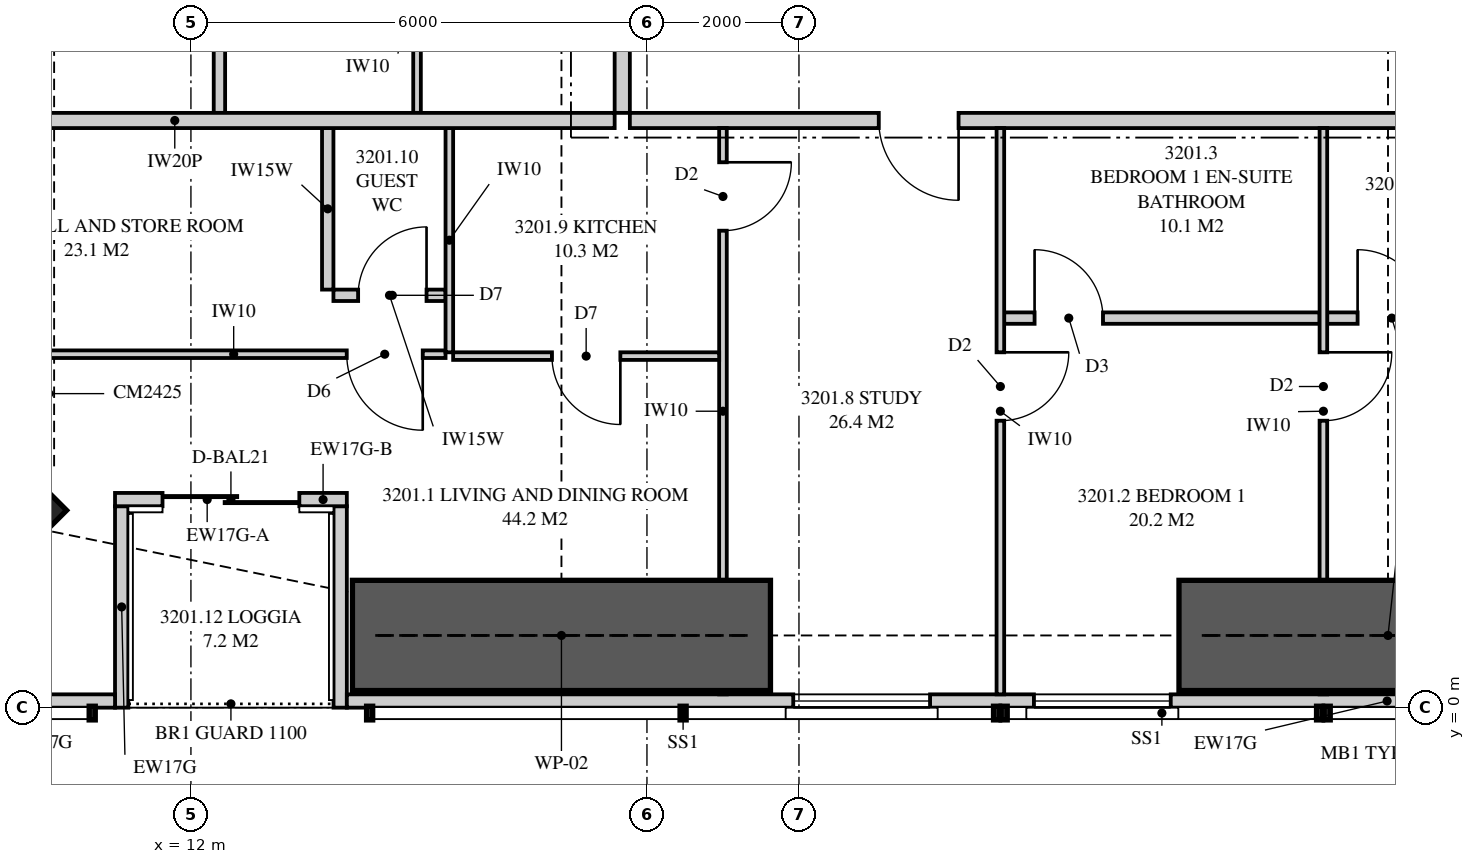
"""IFC4 building model, lengths in metres.
Left out: names, types, materials, properties, quantities, classifications, styles, units other than length and angle.
Written with IfcOpenShell. Run it as: python <this file> out.ifc"""

import sys

from ifc_helpers import new_model, si_unit, direction, frame, frame_2d, origin, origin_2d, place, context, subcontext, project, spatial, polyline, rectangle, outline, extrude, element, fill, save


model = new_model("IFC4")
c1 = context("Model", 3, precision=1e-05, world=origin(), true_north=direction((0.0, 1.0)))
c2 = subcontext(c1, "Body", "Model", "MODEL_VIEW")
j1 = project(units=[si_unit("LENGTHUNIT", "METRE"), si_unit("PLANEANGLEUNIT", "RADIAN")], contexts=[c1])
p1 = place(None, origin())
s1 = spatial("IfcSite", under=j1, at=p1, CompositionType="ELEMENT")
p2 = place(p1, origin())
s2 = spatial("IfcBuilding", under=s1, at=p2, CompositionType="ELEMENT")
p3 = place(p2, frame((0.0, 0.0, 118.25)))
s3 = spatial("IfcBuildingStorey", under=s2, at=p3, CompositionType="ELEMENT", Elevation=118.25)
p4 = place(p3, frame((8.631, 2.631, 0.0), z_axis=(0.0, 0.0, 1.0), x_axis=(0.707106781187, 0.707106781187, 0.0)))
e1 = element("IfcColumn", 1, at=p4, inside=s3, PredefinedType="COLUMN", context=c2, shape_type="SweptSolid", body=[
    extrude(rectangle(XDim=2.4, YDim=2.5, at=origin_2d()), origin(), (0.0, 0.0, 1.0), 3.35),
])
p5 = place(p3, frame((9.051, 0.087, 0.0), z_axis=(0.0, 0.0, 1.0), x_axis=(1.0, 0.0, 0.0)))
e2 = element("IfcWall", 2, at=p5, inside=s3, PredefinedType="SOLIDWALL", context=c2, shape_type="SweptSolid", body=[
    extrude(rectangle(XDim=1.95, YDim=0.175, at=frame_2d((0.975, 0.0))), origin(), (0.0, 0.0, 1.0), 3.11),
])
p6 = place(p3, frame((14.051, 0.087, 0.0), z_axis=(0.0, 0.0, 1.0), x_axis=(1.0, 0.0, 0.0)))
e3 = element("IfcWall", 3, at=p6, inside=s3, PredefinedType="SOLIDWALL", context=c2, shape_type="SweptSolid", body=[
    extrude(outline(polyline([(0.0, 0.0), (27.374, 0.0), (27.374, 3.11), (24.777, 3.11), (24.777, 2.15), (24.732, 2.15), (24.732, 3.11), (24.574, 3.11), (24.574, 2.15), (2.824, 2.15), (2.824, 3.11), (2.666, 3.11), (2.666, 2.15), (2.62, 2.15), (2.62, 3.11), (0.0, 3.11), (0.0, 0.0)])), frame((0.0, 0.087, 0.0), z_axis=(0.0, -1.0, 0.0), x_axis=(1.0, 0.0, 0.0)), (0.0, 0.0, 1.0), 0.175),
])
p7 = place(p6, frame((5.874, 0.0, 0.4)))
e4 = element("IfcOpeningElement", 4, at=p7, cuts=e3, PredefinedType="OPENING", context=c2, shape_type="SweptSolid", body=[
    extrude(rectangle(XDim=1.8, YDim=1.7, at=frame_2d((0.9, 0.85))), frame((0.0, 0.097, 0.0), z_axis=(0.0, -1.0, 0.0), x_axis=(1.0, 0.0, 0.0)), (0.0, 0.0, 1.0), 0.195),
])
p8 = place(p6, frame((9.04, 0.0, 0.4)))
e5 = element("IfcOpeningElement", 5, at=p8, cuts=e3, PredefinedType="OPENING", context=c2, shape_type="SweptSolid", body=[
    extrude(rectangle(XDim=1.8, YDim=1.7, at=frame_2d((0.9, 0.85))), frame((0.0, 0.097, 0.0), z_axis=(0.0, -1.0, 0.0), x_axis=(1.0, 0.0, 0.0)), (0.0, 0.0, 1.0), 0.195),
])
p9 = place(p6, frame((16.564, 0.0, 0.4)))
e6 = element("IfcOpeningElement", 6, at=p9, cuts=e3, PredefinedType="OPENING", context=c2, shape_type="SweptSolid", body=[
    extrude(rectangle(XDim=1.8, YDim=1.7, at=frame_2d((0.9, 0.85))), frame((0.0, 0.097, 0.0), z_axis=(0.0, -1.0, 0.0), x_axis=(1.0, 0.0, 0.0)), (0.0, 0.0, 1.0), 0.195),
])
p10 = place(p6, frame((19.889, 0.0, 0.4)))
e7 = element("IfcOpeningElement", 7, at=p10, cuts=e3, PredefinedType="OPENING", context=c2, shape_type="SweptSolid", body=[
    extrude(rectangle(XDim=1.8, YDim=1.7, at=frame_2d((0.9, 0.85))), frame((0.0, 0.097, 0.0), z_axis=(0.0, -1.0, 0.0), x_axis=(1.0, 0.0, 0.0)), (0.0, 0.0, 1.0), 0.195),
])
p11 = place(p3, frame((11.001, 2.738, 0.0), z_axis=(0.0, 0.0, 1.0), x_axis=(1.0, 0.0, 0.0)))
e8 = element("IfcWall", 8, at=p11, inside=s3, PredefinedType="SOLIDWALL", context=c2, shape_type="SweptSolid", body=[
    extrude(rectangle(XDim=2.425, YDim=0.175, at=frame_2d((1.212, 0.0))), origin(), (0.0, 0.0, 1.0), 2.15),
])
p12 = place(p11, frame((0.625, 0.0, 0.0)))
e9 = element("IfcOpeningElement", 9, at=p12, cuts=e8, PredefinedType="OPENING", context=c2, shape_type="SweptSolid", body=[
    extrude(rectangle(XDim=1.8, YDim=2.1, at=frame_2d((0.9, 1.05))), frame((0.0, 0.097, 0.0), z_axis=(0.0, -1.0, 0.0), x_axis=(1.0, 0.0, 0.0)), (0.0, 0.0, 1.0), 0.195),
])
p13 = place(p3, frame((13.426, 2.738, 0.0), z_axis=(0.0, 0.0, 1.0), x_axis=(1.0, 0.0, 0.0)))
e10 = element("IfcWall", 10, at=p13, inside=s3, PredefinedType="SOLIDWALL", context=c2, shape_type="SweptSolid", body=[
    extrude(rectangle(XDim=0.625, YDim=0.175, at=frame_2d((0.312, 0.0))), origin(), (0.0, 0.0, 1.0), 3.11),
])
p14 = place(p3, frame((11.089, 0.0, 0.0), z_axis=(0.0, 0.0, 1.0), x_axis=(0.0, 1.0, 0.0)))
e11 = element("IfcWall", 11, at=p14, inside=s3, PredefinedType="SOLIDWALL", context=c2, shape_type="SweptSolid", body=[
    extrude(outline(polyline([(0.0, 0.0), (2.65, 0.0), (2.65, 2.15), (1.296, 2.15), (1.296, 3.11), (0.0, 3.11), (0.0, 0.0)])), frame((0.0, 0.087, 0.0), z_axis=(0.0, -1.0, 0.0), x_axis=(1.0, 0.0, 0.0)), (0.0, 0.0, 1.0), 0.175),
])
p15 = place(p3, frame((13.964, 0.0, 0.0), z_axis=(0.0, 0.0, 1.0), x_axis=(0.0, 1.0, 0.0)))
e12 = element("IfcWall", 12, at=p15, inside=s3, PredefinedType="SOLIDWALL", context=c2, shape_type="SweptSolid", body=[
    extrude(outline(polyline([(0.0, 0.0), (2.65, 0.0), (2.65, 3.11), (2.378, 3.11), (2.378, 2.15), (0.709, 2.15), (0.709, 3.11), (0.0, 3.11), (0.0, 0.0)])), frame((0.0, 0.087, 0.0), z_axis=(0.0, -1.0, 0.0), x_axis=(1.0, 0.0, 0.0)), (0.0, 0.0, 1.0), 0.175),
])
p16 = place(p3, frame((17.775, 7.725, 0.0), z_axis=(0.0, 0.0, 1.0), x_axis=(1.0, 0.0, 0.0)))
e13 = element("IfcWall", 13, at=p16, inside=s3, PredefinedType="PARTITIONING", context=c2, shape_type="SweptSolid", body=[
    extrude(outline(polyline([(0.0, 0.0), (19.225, 0.0), (19.225, 3.11), (10.312, 3.11), (10.312, 2.541), (9.638, 2.541), (9.638, 3.11), (0.0, 3.11), (0.0, 0.0)])), frame((0.0, 0.1, 0.0), z_axis=(0.0, -1.0, 0.0), x_axis=(1.0, 0.0, 0.0)), (0.0, 0.0, 1.0), 0.2),
])
p17 = place(p16, frame((3.275, 0.0, 0.0)))
e14 = element("IfcOpeningElement", 14, at=p17, cuts=e13, PredefinedType="OPENING", context=c2, shape_type="SweptSolid", body=[
    extrude(rectangle(XDim=1.05, YDim=2.2, at=frame_2d((0.525, 1.1))), frame((0.0, 0.11, 0.0), z_axis=(0.0, -1.0, 0.0), x_axis=(1.0, 0.0, 0.0)), (0.0, 0.0, 1.0), 0.22),
])
p18 = place(p3, frame((22.65, 0.175, 0.0), z_axis=(0.0, 0.0, 1.0), x_axis=(0.0, 1.0, 0.0)))
e15 = element("IfcWall", 15, at=p18, inside=s3, PredefinedType="PARTITIONING", context=c2, shape_type="SweptSolid", body=[
    extrude(outline(polyline([(0.0, 0.0), (7.45, 0.0), (7.45, 3.11), (1.635, 3.11), (1.635, 2.15), (0.0, 2.15), (0.0, 3.11), (0.0, 0.0)])), frame((0.0, 0.05, 0.0), z_axis=(0.0, -1.0, 0.0), x_axis=(1.0, 0.0, 0.0)), (0.0, 0.0, 1.0), 0.1),
])
p19 = place(p18, frame((3.6, 0.0, 0.0)))
e16 = element("IfcOpeningElement", 16, at=p19, cuts=e15, PredefinedType="OPENING", context=c2, shape_type="SweptSolid", body=[
    extrude(rectangle(XDim=0.9, YDim=2.1, at=frame_2d((0.45, 1.05))), frame((0.0, 0.06, 0.0), z_axis=(0.0, -1.0, 0.0), x_axis=(1.0, 0.0, 0.0)), (0.0, 0.0, 1.0), 0.12),
])
p20 = place(p3, frame((26.9, 0.175, 0.0), z_axis=(0.0, 0.0, 1.0), x_axis=(0.0, 1.0, 0.0)))
e17 = element("IfcWall", 17, at=p20, inside=s3, PredefinedType="PARTITIONING", context=c2, shape_type="SweptSolid", body=[
    extrude(outline(polyline([(0.529, 2.15), (0.0, 2.15), (0.0, 0.0), (0.529, 0.0), (0.529, 0.889), (1.021, 0.889), (1.021, 0.0), (7.45, 0.0), (7.45, 3.11), (1.635, 3.11), (1.635, 2.15), (1.021, 2.15), (1.021, 1.261), (0.529, 1.261), (0.529, 2.15)])), frame((0.0, 0.05, 0.0), z_axis=(0.0, -1.0, 0.0), x_axis=(1.0, 0.0, 0.0)), (0.0, 0.0, 1.0), 0.1),
])
p21 = place(p20, frame((3.6, 0.0, 0.0)))
e18 = element("IfcOpeningElement", 18, at=p21, cuts=e17, PredefinedType="OPENING", context=c2, shape_type="SweptSolid", body=[
    extrude(rectangle(XDim=0.9, YDim=2.1, at=frame_2d((0.45, 1.05))), frame((0.0, 0.06, 0.0), z_axis=(0.0, -1.0, 0.0), x_axis=(1.0, 0.0, 0.0)), (0.0, 0.0, 1.0), 0.12),
])
p22 = place(p3, frame((22.7, 5.125, 0.0), z_axis=(0.0, 0.0, 1.0), x_axis=(1.0, 0.0, 0.0)))
e19 = element("IfcWall", 19, at=p22, inside=s3, PredefinedType="PLUMBINGWALL", context=c2, shape_type="SweptSolid", body=[
    extrude(rectangle(XDim=4.15, YDim=0.15, at=frame_2d((2.075, 0.0))), origin(), (0.0, 0.0, 1.0), 3.11),
])
p23 = place(p22, frame((0.4, 0.0, 0.0)))
e20 = element("IfcOpeningElement", 20, at=p23, cuts=e19, PredefinedType="OPENING", context=c2, shape_type="SweptSolid", body=[
    extrude(rectangle(XDim=0.9, YDim=2.1, at=frame_2d((0.45, 1.05))), frame((0.0, 0.085, 0.0), z_axis=(0.0, -1.0, 0.0), x_axis=(1.0, 0.0, 0.0)), (0.0, 0.0, 1.0), 0.17),
])
p24 = place(p3, frame((26.95, 5.125, 0.0), z_axis=(0.0, 0.0, 1.0), x_axis=(1.0, 0.0, 0.0)))
e21 = element("IfcWall", 21, at=p24, inside=s3, PredefinedType="PLUMBINGWALL", context=c2, shape_type="SweptSolid", body=[
    extrude(outline(polyline([(0.0, 0.0), (5.9, 0.0), (5.9, 3.11), (1.112, 3.11), (1.112, 2.541), (0.488, 2.541), (0.488, 3.11), (0.0, 3.11), (0.0, 0.0)])), frame((0.0, 0.075, 0.0), z_axis=(0.0, -1.0, 0.0), x_axis=(1.0, 0.0, 0.0)), (0.0, 0.0, 1.0), 0.15),
])
p25 = place(p24, frame((0.4, 0.0, 0.0)))
e22 = element("IfcOpeningElement", 22, at=p25, cuts=e21, PredefinedType="OPENING", context=c2, shape_type="SweptSolid", body=[
    extrude(rectangle(XDim=0.9, YDim=2.1, at=frame_2d((0.45, 1.05))), frame((0.0, 0.085, 0.0), z_axis=(0.0, -1.0, 0.0), x_axis=(1.0, 0.0, 0.0)), (0.0, 0.0, 1.0), 0.17),
])
p26 = place(p3, frame((19.0, 0.175, 0.0), z_axis=(0.0, 0.0, 1.0), x_axis=(0.0, 1.0, 0.0)))
e23 = element("IfcWall", 23, at=p26, inside=s3, PredefinedType="PARTITIONING", context=c2, shape_type="SweptSolid", body=[
    extrude(outline(polyline([(0.529, 2.15), (0.0, 2.15), (0.0, 0.0), (0.529, 0.0), (0.529, 0.017), (1.021, 0.017), (1.021, 0.0), (7.45, 0.0), (7.45, 3.11), (1.635, 3.11), (1.635, 2.15), (1.021, 2.15), (1.021, 2.133), (0.529, 2.133), (0.529, 2.15)])), frame((0.0, 0.05, 0.0), z_axis=(0.0, -1.0, 0.0), x_axis=(1.0, 0.0, 0.0)), (0.0, 0.0, 1.0), 0.1),
])
p27 = place(p26, frame((6.1, 0.0, 0.0)))
e24 = element("IfcOpeningElement", 24, at=p27, cuts=e23, PredefinedType="OPENING", context=c2, shape_type="SweptSolid", body=[
    extrude(rectangle(XDim=0.9, YDim=2.1, at=frame_2d((0.45, 1.05))), frame((0.0, 0.06, 0.0), z_axis=(0.0, -1.0, 0.0), x_axis=(1.0, 0.0, 0.0)), (0.0, 0.0, 1.0), 0.12),
])
p28 = place(p3, frame((15.45, 4.625, 0.0), z_axis=(0.0, 0.0, 1.0), x_axis=(1.0, 0.0, 0.0)))
e25 = element("IfcWall", 25, at=p28, inside=s3, PredefinedType="PARTITIONING", context=c2, shape_type="SweptSolid", body=[
    extrude(outline(polyline([(0.0, 0.0), (3.5, 0.0), (3.5, 3.11), (1.712, 3.11), (1.712, 2.541), (1.138, 2.541), (1.138, 3.11), (0.0, 3.11), (0.0, 0.0)])), frame((0.0, 0.05, 0.0), z_axis=(0.0, -1.0, 0.0), x_axis=(1.0, 0.0, 0.0)), (0.0, 0.0, 1.0), 0.1),
])
p29 = place(p28, frame((1.3, 0.0, 0.0)))
e26 = element("IfcOpeningElement", 26, at=p29, cuts=e25, PredefinedType="OPENING", context=c2, shape_type="SweptSolid", body=[
    extrude(rectangle(XDim=0.9, YDim=2.1, at=frame_2d((0.45, 1.05))), frame((0.0, 0.06, 0.0), z_axis=(0.0, -1.0, 0.0), x_axis=(1.0, 0.0, 0.0)), (0.0, 0.0, 1.0), 0.12),
])
p30 = place(p3, frame((15.4, 4.675, 0.0), z_axis=(0.0, 0.0, 1.0), x_axis=(0.0, 1.0, 0.0)))
e27 = element("IfcWall", 27, at=p30, inside=s3, PredefinedType="PARTITIONING", context=c2, shape_type="SweptSolid", body=[
    extrude(rectangle(XDim=2.95, YDim=0.1, at=frame_2d((1.475, 0.0))), origin(), (0.0, 0.0, 1.0), 3.11),
])
p31 = place(p3, frame((13.875, 5.425, 0.0), z_axis=(0.0, 0.0, 1.0), x_axis=(1.0, 0.0, 0.0)))
e28 = element("IfcWall", 28, at=p31, inside=s3, PredefinedType="PLUMBINGWALL", context=c2, shape_type="SweptSolid", body=[
    extrude(rectangle(XDim=1.475, YDim=0.15, at=frame_2d((0.738, 0.0))), origin(), (0.0, 0.0, 1.0), 3.11),
])
p32 = place(p31, frame((0.325, 0.0, 0.0)))
e29 = element("IfcOpeningElement", 29, at=p32, cuts=e28, PredefinedType="OPENING", context=c2, shape_type="SweptSolid", body=[
    extrude(rectangle(XDim=0.9, YDim=2.1, at=frame_2d((0.45, 1.05))), frame((0.0, 0.085, 0.0), z_axis=(0.0, -1.0, 0.0), x_axis=(1.0, 0.0, 0.0)), (0.0, 0.0, 1.0), 0.17),
])
p33 = place(p3, frame((13.8, 5.5, 0.0), z_axis=(0.0, 0.0, 1.0), x_axis=(0.0, 1.0, 0.0)))
e30 = element("IfcWall", 30, at=p33, inside=s3, PredefinedType="PLUMBINGWALL", context=c2, shape_type="SweptSolid", body=[
    extrude(rectangle(XDim=2.125, YDim=0.15, at=frame_2d((1.062, 0.0))), origin(), (0.0, 0.0, 1.0), 3.11),
])
p34 = place(p3, frame((6.175, 4.65, 0.0), z_axis=(0.0, 0.0, 1.0), x_axis=(1.0, 0.0, 0.0)))
e31 = element("IfcWall", 31, at=p34, inside=s3, PredefinedType="PARTITIONING", context=c2, shape_type="SweptSolid", body=[
    extrude(outline(polyline([(0.0, 0.0), (9.175, 0.0), (9.175, 3.11), (5.285, 3.11), (5.285, 2.51), (3.0, 2.51), (3.0, 2.15), (1.258, 2.15), (1.258, 3.11), (0.0, 3.11), (0.0, 0.0)])), frame((0.0, 0.05, 0.0), z_axis=(0.0, -1.0, 0.0), x_axis=(1.0, 0.0, 0.0)), (0.0, 0.0, 1.0), 0.1),
])
p35 = place(p34, frame((7.875, 0.0, 0.0)))
e32 = element("IfcOpeningElement", 32, at=p35, cuts=e31, PredefinedType="OPENING", context=c2, shape_type="SweptSolid", body=[
    extrude(rectangle(XDim=1.0, YDim=2.1, at=frame_2d((0.5, 1.05))), frame((0.0, 0.06, 0.0), z_axis=(0.0, -1.0, 0.0), x_axis=(1.0, 0.0, 0.0)), (0.0, 0.0, 1.0), 0.12),
])
p36 = place(p3, frame((6.0, 7.725, 0.0), z_axis=(0.0, 0.0, 1.0), x_axis=(1.0, 0.0, 0.0)))
e33 = element("IfcWall", 33, at=p36, inside=s3, PredefinedType="PARTITIONING", context=c2, shape_type="SweptSolid", body=[
    extrude(outline(polyline([(0.0, 0.0), (11.575, 0.0), (11.575, 3.11), (11.212, 3.11), (11.212, 2.541), (10.538, 2.541), (10.538, 3.11), (5.51, 3.11), (5.51, 2.51), (2.969, 2.51), (2.969, 2.541), (2.727, 2.541), (2.727, 2.15), (0.884, 2.15), (0.884, 3.11), (0.0, 3.11), (0.0, 0.0)])), frame((0.0, 0.1, 0.0), z_axis=(0.0, -1.0, 0.0), x_axis=(1.0, 0.0, 0.0)), (0.0, 0.0, 1.0), 0.2),
])
p37 = place(p3, frame((17.675, 7.825, 0.0), z_axis=(0.0, 0.0, 1.0), x_axis=(0.0, 1.0, 0.0)))
e34 = element("IfcWall", 34, at=p37, inside=s3, PredefinedType="PARTITIONING", context=c2, shape_type="SweptSolid", body=[
    extrude(outline(polyline([(0.0, 0.0), (9.075, 0.0), (9.075, 3.11), (3.087, 3.11), (3.087, 2.541), (2.413, 2.541), (2.413, 3.11), (0.0, 3.11), (0.0, 0.0)])), frame((0.0, 0.1, 0.0), z_axis=(0.0, -1.0, 0.0), x_axis=(1.0, 0.0, 0.0)), (0.0, 0.0, 1.0), 0.2),
])
p38 = place(p3, frame((12.375, 7.825, 0.0), z_axis=(0.0, 0.0, 1.0), x_axis=(0.0, 1.0, 0.0)))
e35 = element("IfcWall", 35, at=p38, inside=s3, PredefinedType="PLUMBINGWALL", context=c2, shape_type="SweptSolid", body=[
    extrude(outline(polyline([(0.0, 0.0), (3.45, 0.0), (3.45, 3.11), (3.062, 3.11), (3.062, 2.541), (2.438, 2.541), (2.438, 3.11), (0.0, 3.11), (0.0, 0.0)])), frame((0.0, 0.075, 0.0), z_axis=(0.0, -1.0, 0.0), x_axis=(1.0, 0.0, 0.0)), (0.0, 0.0, 1.0), 0.15),
])
p39 = place(p3, frame((14.975, 7.825, 0.0), z_axis=(0.0, 0.0, 1.0), x_axis=(0.0, 1.0, 0.0)))
e36 = element("IfcWall", 36, at=p39, inside=s3, PredefinedType="PARTITIONING", context=c2, shape_type="SweptSolid", body=[
    extrude(outline(polyline([(0.0, 0.0), (3.45, 0.0), (3.45, 3.11), (3.037, 3.11), (3.037, 2.541), (2.463, 2.541), (2.463, 3.11), (0.0, 3.11), (0.0, 0.0)])), frame((0.0, 0.05, 0.0), z_axis=(0.0, -1.0, 0.0), x_axis=(1.0, 0.0, 0.0)), (0.0, 0.0, 1.0), 0.1),
])
for number, where, z_axis, x_axis in (
    (37, (14.125, 0.95, 0.0), (0.0, 0.0, 1.0), (1.0, 0.0, 0.0)),
    (38, (25.0, 0.95, 0.0), (0.0, 0.0, 1.0), (1.0, 0.0, 0.0)),
):
    element("IfcWall", number, at=place(p3, frame(where, z_axis=z_axis, x_axis=x_axis)), inside=s3, PredefinedType="SHEAR", context=c2, shape_type="SweptSolid", body=[
        extrude(rectangle(XDim=5.5, YDim=1.45, at=frame_2d((2.75, 0.0))), origin(), (0.0, 0.0, 1.0), 3.35),
    ])
p40 = place(p12, origin())
e39 = element("IfcDoor", 39, at=p40, inside=s3, OperationType="SLIDING_TO_LEFT", PredefinedType="DOOR", context=c2, shape_type="SweptSolid", body=[
    extrude(rectangle(XDim=1.8, YDim=2.1, at=frame_2d((0.9, 1.05))), frame((0.0, 0.025, 0.0), z_axis=(0.0, -1.0, 0.0), x_axis=(1.0, 0.0, 0.0)), (0.0, 0.0, 1.0), 0.05),
])
fill(e9, e39)
p41 = place(p7, origin())
e40 = element("IfcWindow", 40, at=p41, inside=s3, PartitioningType="SINGLE_PANEL", PredefinedType="WINDOW", context=c2, shape_type="SweptSolid", body=[
    extrude(rectangle(XDim=1.8, YDim=1.7, at=frame_2d((0.9, 0.85))), frame((0.0, 0.03, 0.0), z_axis=(0.0, -1.0, 0.0), x_axis=(1.0, 0.0, 0.0)), (0.0, 0.0, 1.0), 0.06),
])
fill(e4, e40)
p42 = place(p8, origin())
e41 = element("IfcWindow", 41, at=p42, inside=s3, PartitioningType="SINGLE_PANEL", PredefinedType="WINDOW", context=c2, shape_type="SweptSolid", body=[
    extrude(rectangle(XDim=1.8, YDim=1.7, at=frame_2d((0.9, 0.85))), frame((0.0, 0.03, 0.0), z_axis=(0.0, -1.0, 0.0), x_axis=(1.0, 0.0, 0.0)), (0.0, 0.0, 1.0), 0.06),
])
fill(e5, e41)
p43 = place(p17, frame((1.05, 0.0, 0.0), z_axis=(0.0, 0.0, 1.0), x_axis=(-1.0, 0.0, 0.0)))
e42 = element("IfcDoor", 42, at=p43, inside=s3, OperationType="SINGLE_SWING_LEFT", PredefinedType="DOOR", context=c2, shape_type="SweptSolid", body=[
    extrude(rectangle(XDim=1.05, YDim=2.2, at=frame_2d((0.525, 1.1))), frame((0.0, 0.025, 0.0), z_axis=(0.0, -1.0, 0.0), x_axis=(1.0, 0.0, 0.0)), (0.0, 0.0, 1.0), 0.05),
])
fill(e14, e42)
p44 = place(p19, frame((0.9, 0.0, 0.0), z_axis=(0.0, 0.0, 1.0), x_axis=(-1.0, 0.0, 0.0)))
e43 = element("IfcDoor", 43, at=p44, inside=s3, OperationType="SINGLE_SWING_LEFT", PredefinedType="DOOR", context=c2, shape_type="SweptSolid", body=[
    extrude(rectangle(XDim=0.9, YDim=2.1, at=frame_2d((0.45, 1.05))), frame((0.0, 0.025, 0.0), z_axis=(0.0, -1.0, 0.0), x_axis=(1.0, 0.0, 0.0)), (0.0, 0.0, 1.0), 0.05),
])
fill(e16, e43)
p45 = place(p23, origin())
e44 = element("IfcDoor", 44, at=p45, inside=s3, OperationType="SINGLE_SWING_LEFT", PredefinedType="DOOR", context=c2, shape_type="SweptSolid", body=[
    extrude(rectangle(XDim=0.9, YDim=2.1, at=frame_2d((0.45, 1.05))), frame((0.0, 0.025, 0.0), z_axis=(0.0, -1.0, 0.0), x_axis=(1.0, 0.0, 0.0)), (0.0, 0.0, 1.0), 0.05),
])
fill(e20, e44)
p46 = place(p21, frame((0.9, 0.0, 0.0), z_axis=(0.0, 0.0, 1.0), x_axis=(-1.0, 0.0, 0.0)))
e45 = element("IfcDoor", 45, at=p46, inside=s3, OperationType="SINGLE_SWING_LEFT", PredefinedType="DOOR", context=c2, shape_type="SweptSolid", body=[
    extrude(rectangle(XDim=0.9, YDim=2.1, at=frame_2d((0.45, 1.05))), frame((0.0, 0.025, 0.0), z_axis=(0.0, -1.0, 0.0), x_axis=(1.0, 0.0, 0.0)), (0.0, 0.0, 1.0), 0.05),
])
fill(e18, e45)
p47 = place(p25, origin())
e46 = element("IfcDoor", 46, at=p47, inside=s3, OperationType="SINGLE_SWING_LEFT", PredefinedType="DOOR", context=c2, shape_type="SweptSolid", body=[
    extrude(rectangle(XDim=0.9, YDim=2.1, at=frame_2d((0.45, 1.05))), frame((0.0, 0.025, 0.0), z_axis=(0.0, -1.0, 0.0), x_axis=(1.0, 0.0, 0.0)), (0.0, 0.0, 1.0), 0.05),
])
fill(e22, e46)
p48 = place(p27, frame((0.9, 0.0, 0.0), z_axis=(0.0, 0.0, 1.0), x_axis=(-1.0, 0.0, 0.0)))
e47 = element("IfcDoor", 47, at=p48, inside=s3, OperationType="SINGLE_SWING_LEFT", PredefinedType="DOOR", context=c2, shape_type="SweptSolid", body=[
    extrude(rectangle(XDim=0.9, YDim=2.1, at=frame_2d((0.45, 1.05))), frame((0.0, 0.025, 0.0), z_axis=(0.0, -1.0, 0.0), x_axis=(1.0, 0.0, 0.0)), (0.0, 0.0, 1.0), 0.05),
])
fill(e24, e47)
p49 = place(p29, frame((0.9, 0.0, 0.0), z_axis=(0.0, 0.0, 1.0), x_axis=(-1.0, 0.0, 0.0)))
e48 = element("IfcDoor", 48, at=p49, inside=s3, OperationType="SINGLE_SWING_LEFT", PredefinedType="DOOR", context=c2, shape_type="SweptSolid", body=[
    extrude(rectangle(XDim=0.9, YDim=2.1, at=frame_2d((0.45, 1.05))), frame((0.0, 0.025, 0.0), z_axis=(0.0, -1.0, 0.0), x_axis=(1.0, 0.0, 0.0)), (0.0, 0.0, 1.0), 0.05),
])
fill(e26, e48)
p50 = place(p32, origin())
e49 = element("IfcDoor", 49, at=p50, inside=s3, OperationType="SINGLE_SWING_RIGHT", PredefinedType="DOOR", context=c2, shape_type="SweptSolid", body=[
    extrude(rectangle(XDim=0.9, YDim=2.1, at=frame_2d((0.45, 1.05))), frame((0.0, 0.025, 0.0), z_axis=(0.0, -1.0, 0.0), x_axis=(1.0, 0.0, 0.0)), (0.0, 0.0, 1.0), 0.05),
])
fill(e29, e49)
p51 = place(p35, frame((1.0, 0.0, 0.0), z_axis=(0.0, 0.0, 1.0), x_axis=(-1.0, 0.0, 0.0)))
e50 = element("IfcDoor", 50, at=p51, inside=s3, OperationType="SINGLE_SWING_LEFT", PredefinedType="DOOR", context=c2, shape_type="SweptSolid", body=[
    extrude(rectangle(XDim=1.0, YDim=2.1, at=frame_2d((0.5, 1.05))), frame((0.0, 0.025, 0.0), z_axis=(0.0, -1.0, 0.0), x_axis=(1.0, 0.0, 0.0)), (0.0, 0.0, 1.0), 0.05),
])
fill(e32, e50)
save(model, sys.argv[1])
